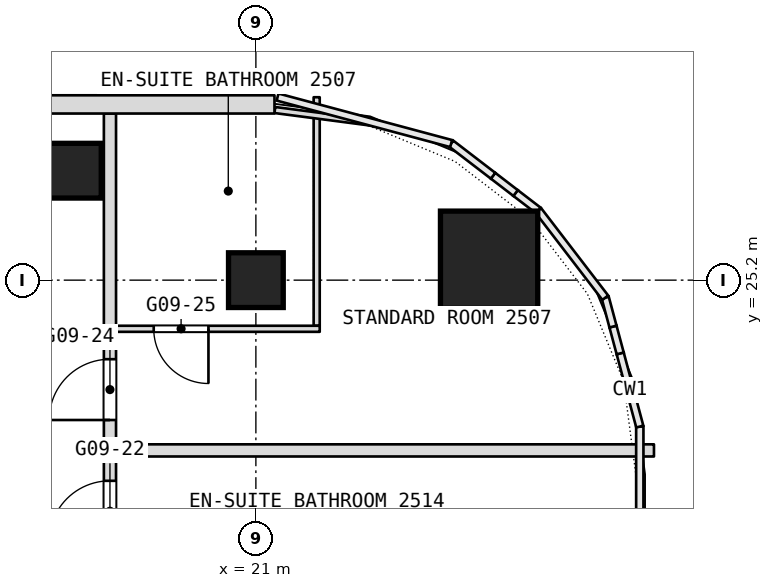
"""IFC4 building model, lengths in metres.
Left out: names, types, materials, properties, quantities, classifications, styles, units other than length and angle.
Written with IfcOpenShell. Run it as: python <this file> out.ifc"""

import sys

from ifc_helpers import new_model, si_unit, direction, frame, frame_2d, origin, origin_2d, place, context, subcontext, project, spatial, rectangle, extrude, element, fill, save


model = new_model("IFC4")
c1 = context("Model", 3, precision=1e-05, world=origin(), true_north=direction((0.0, 1.0)))
c2 = subcontext(c1, "Body", "Model", "MODEL_VIEW")
j1 = project(units=[si_unit("LENGTHUNIT", "METRE"), si_unit("PLANEANGLEUNIT", "RADIAN")], contexts=[c1])
p1 = place(None, origin())
s1 = spatial("IfcSite", under=j1, at=p1, CompositionType="ELEMENT")
p2 = place(p1, origin())
s2 = spatial("IfcBuilding", under=s1, at=p2, CompositionType="ELEMENT")
p3 = place(p2, frame((0.0, 0.0, 115.7)))
s3 = spatial("IfcBuildingStorey", under=s2, at=p3, CompositionType="ELEMENT", Elevation=115.7)
p4 = place(p3, frame((24.835, 25.535, 0.0), z_axis=(0.0, 0.0, 1.0), x_axis=(1.0, 0.0, 0.0)))
e1 = element("IfcColumn", 1, at=p4, inside=s3, PredefinedType="COLUMN", context=c2, shape_type="SweptSolid", body=[
    extrude(rectangle(XDim=1.6, YDim=1.6, at=origin_2d()), origin(), (0.0, 0.0, 1.0), 3.6),
])
for number, where, z_axis, x_axis in (
    (2, (21.0, 25.2, 0.0), (0.0, 0.0, 1.0), (1.0, 0.0, 0.0)),
    (3, (18.007, 27.0, 0.0), (0.0, 0.0, 1.0), (1.0, 0.0, 0.0)),
):
    element("IfcColumn", number, at=place(p3, frame(where, z_axis=z_axis, x_axis=x_axis)), inside=s3, PredefinedType="COLUMN", context=c2, shape_type="SweptSolid", body=[
        extrude(rectangle(XDim=0.9, YDim=0.9, at=origin_2d()), origin(), (0.0, 0.0, 1.0), 3.6),
    ])
p5 = place(p3, frame((22.0, 24.45, 0.0), z_axis=(0.0, 0.0, 1.0), x_axis=(0.0, 1.0, 0.0)))
e4 = element("IfcWall", 4, at=p5, inside=s3, PredefinedType="PARTITIONING", context=c2, shape_type="SweptSolid", body=[
    extrude(rectangle(XDim=3.758, YDim=0.1, at=frame_2d((1.879, 0.0))), origin(), (0.0, 0.0, 1.0), 3.34),
])
p6 = place(p3, frame((18.6, -21.708, 0.0), z_axis=(0.0, 0.0, 1.0), x_axis=(0.0, 1.0, 0.0)))
e5 = element("IfcWall", 5, at=p6, inside=s3, PredefinedType="PARTITIONING", context=c2, shape_type="SweptSolid", body=[
    extrude(rectangle(XDim=49.648, YDim=0.2, at=frame_2d((24.824, 0.0))), origin(), (0.0, 0.0, 1.0), 3.34),
])
p7 = place(p6, frame((2.8, 0.0, 0.0)))
e6 = element("IfcOpeningElement", 6, at=p7, cuts=e5, PredefinedType="OPENING", context=c2, shape_type="SweptSolid", body=[
    extrude(rectangle(XDim=1.0, YDim=2.1, at=frame_2d((0.5, 1.05))), frame((0.0, 0.1, 0.0), z_axis=(0.0, -1.0, 0.0), x_axis=(1.0, 0.0, 0.0)), (0.0, 0.0, 1.0), 0.2),
])
p8 = place(p6, frame((10.658, 0.0, 0.0)))
e7 = element("IfcOpeningElement", 7, at=p8, cuts=e5, PredefinedType="OPENING", context=c2, shape_type="SweptSolid", body=[
    extrude(rectangle(XDim=1.1, YDim=2.1, at=frame_2d((0.55, 1.05))), frame((0.0, 0.1, 0.0), z_axis=(0.0, -1.0, 0.0), x_axis=(1.0, 0.0, 0.0)), (0.0, 0.0, 1.0), 0.2),
])
p9 = place(p6, frame((16.608, 0.0, 0.0)))
e8 = element("IfcOpeningElement", 8, at=p9, cuts=e5, PredefinedType="OPENING", context=c2, shape_type="SweptSolid", body=[
    extrude(rectangle(XDim=1.8, YDim=2.1, at=frame_2d((0.9, 1.05))), frame((0.0, 0.1, 0.0), z_axis=(0.0, -1.0, 0.0), x_axis=(1.0, 0.0, 0.0)), (0.0, 0.0, 1.0), 0.2),
])
p10 = place(p6, frame((24.508, 0.0, 0.0)))
e9 = element("IfcOpeningElement", 9, at=p10, cuts=e5, PredefinedType="OPENING", context=c2, shape_type="SweptSolid", body=[
    extrude(rectangle(XDim=1.0, YDim=2.1, at=frame_2d((0.5, 1.05))), frame((0.0, 0.1, 0.0), z_axis=(0.0, -1.0, 0.0), x_axis=(1.0, 0.0, 0.0)), (0.0, 0.0, 1.0), 0.2),
])
p11 = place(p6, frame((26.308, 0.0, 0.0)))
e10 = element("IfcOpeningElement", 10, at=p11, cuts=e5, PredefinedType="OPENING", context=c2, shape_type="SweptSolid", body=[
    extrude(rectangle(XDim=1.0, YDim=2.1, at=frame_2d((0.5, 1.05))), frame((0.0, 0.1, 0.0), z_axis=(0.0, -1.0, 0.0), x_axis=(1.0, 0.0, 0.0)), (0.0, 0.0, 1.0), 0.2),
])
p12 = place(p6, frame((33.708, 0.0, 0.0)))
e11 = element("IfcOpeningElement", 11, at=p12, cuts=e5, PredefinedType="OPENING", context=c2, shape_type="SweptSolid", body=[
    extrude(rectangle(XDim=1.1, YDim=2.1, at=frame_2d((0.55, 1.05))), frame((0.0, 0.1, 0.0), z_axis=(0.0, -1.0, 0.0), x_axis=(1.0, 0.0, 0.0)), (0.0, 0.0, 1.0), 0.2),
])
p13 = place(p6, frame((42.608, 0.0, 0.0)))
e12 = element("IfcOpeningElement", 12, at=p13, cuts=e5, PredefinedType="OPENING", context=c2, shape_type="SweptSolid", body=[
    extrude(rectangle(XDim=1.0, YDim=2.1, at=frame_2d((0.5, 1.05))), frame((0.0, 0.1, 0.0), z_axis=(0.0, -1.0, 0.0), x_axis=(1.0, 0.0, 0.0)), (0.0, 0.0, 1.0), 0.2),
])
p14 = place(p6, frame((44.608, 0.0, 0.0)))
e13 = element("IfcOpeningElement", 13, at=p14, cuts=e5, PredefinedType="OPENING", context=c2, shape_type="SweptSolid", body=[
    extrude(rectangle(XDim=1.0, YDim=2.1, at=frame_2d((0.5, 1.05))), frame((0.0, 0.1, 0.0), z_axis=(0.0, -1.0, 0.0), x_axis=(1.0, 0.0, 0.0)), (0.0, 0.0, 1.0), 0.2),
])
p15 = place(p3, frame((18.7, 22.4, 0.0), z_axis=(0.0, 0.0, 1.0), x_axis=(1.0, 0.0, 0.0)))
e14 = element("IfcWall", 14, at=p15, inside=s3, PredefinedType="PARTITIONING", context=c2, shape_type="SweptSolid", body=[
    extrude(rectangle(XDim=8.847, YDim=0.2, at=frame_2d((4.424, 0.0))), origin(), (0.0, 0.0, 1.0), 3.34),
])
p16 = place(p3, frame((18.7, 24.4, 0.0), z_axis=(0.0, 0.0, 1.0), x_axis=(1.0, 0.0, 0.0)))
e15 = element("IfcWall", 15, at=p16, inside=s3, PredefinedType="PARTITIONING", context=c2, shape_type="SweptSolid", body=[
    extrude(rectangle(XDim=3.35, YDim=0.1, at=frame_2d((1.675, 0.0))), origin(), (0.0, 0.0, 1.0), 3.34),
])
p17 = place(p16, frame((0.62, 0.0, 0.0)))
e16 = element("IfcOpeningElement", 16, at=p17, cuts=e15, PredefinedType="OPENING", context=c2, shape_type="SweptSolid", body=[
    extrude(rectangle(XDim=0.9, YDim=2.1, at=frame_2d((0.45, 1.05))), frame((0.0, 0.05, 0.0), z_axis=(0.0, -1.0, 0.0), x_axis=(1.0, 0.0, 0.0)), (0.0, 0.0, 1.0), 0.1),
])
p18 = place(p3, frame((21.312, 27.998, 0.0), z_axis=(0.0, 0.0, 1.0), x_axis=(0.991547575144, -0.129743617284, 0.0)))
e17 = element("IfcWall", 17, at=p18, inside=s3, PredefinedType="PARTITIONING", context=c2, shape_type="SweptSolid", body=[
    extrude(rectangle(XDim=1.626, YDim=0.1, at=frame_2d((0.813, 0.0))), origin(), (0.0, 0.0, 1.0), 3.34),
])
p19 = place(p3, frame((21.306, 28.09, 0.0), z_axis=(0.0, 0.0, 1.0), x_axis=(-1.0, 0.0, 0.0)))
e18 = element("IfcWall", 18, at=p19, inside=s3, PredefinedType="NOTDEFINED", context=c2, shape_type="SweptSolid", body=[
    extrude(rectangle(XDim=42.612, YDim=0.3, at=frame_2d((21.306, 0.0))), origin(), (0.0, 0.0, 1.0), 3.6),
])
p20 = place(p19, frame((5.406, 0.0, 0.9)))
e19 = element("IfcOpeningElement", 19, at=p20, cuts=e18, PredefinedType="OPENING", context=c2, shape_type="SweptSolid", body=[
    extrude(rectangle(XDim=2.4, YDim=2.1, at=frame_2d((1.2, 1.05))), frame((0.0, 0.15, 0.0), z_axis=(0.0, -1.0, 0.0), x_axis=(1.0, 0.0, 0.0)), (0.0, 0.0, 1.0), 0.3),
])
p21 = place(p19, frame((9.606, 0.0, 0.9)))
e20 = element("IfcOpeningElement", 20, at=p21, cuts=e18, PredefinedType="OPENING", context=c2, shape_type="SweptSolid", body=[
    extrude(rectangle(XDim=2.4, YDim=2.1, at=frame_2d((1.2, 1.05))), frame((0.0, 0.15, 0.0), z_axis=(0.0, -1.0, 0.0), x_axis=(1.0, 0.0, 0.0)), (0.0, 0.0, 1.0), 0.3),
])
p22 = place(p19, frame((13.806, 0.0, 0.9)))
e21 = element("IfcOpeningElement", 21, at=p22, cuts=e18, PredefinedType="OPENING", context=c2, shape_type="SweptSolid", body=[
    extrude(rectangle(XDim=2.4, YDim=2.1, at=frame_2d((1.2, 1.05))), frame((0.0, 0.15, 0.0), z_axis=(0.0, -1.0, 0.0), x_axis=(1.0, 0.0, 0.0)), (0.0, 0.0, 1.0), 0.3),
])
p23 = place(p19, frame((18.006, 0.0, 0.9)))
e22 = element("IfcOpeningElement", 22, at=p23, cuts=e18, PredefinedType="OPENING", context=c2, shape_type="SweptSolid", body=[
    extrude(rectangle(XDim=2.4, YDim=2.1, at=frame_2d((1.2, 1.05))), frame((0.0, 0.15, 0.0), z_axis=(0.0, -1.0, 0.0), x_axis=(1.0, 0.0, 0.0)), (0.0, 0.0, 1.0), 0.3),
])
p24 = place(p19, frame((22.206, 0.0, 0.9)))
e23 = element("IfcOpeningElement", 23, at=p24, cuts=e18, PredefinedType="OPENING", context=c2, shape_type="SweptSolid", body=[
    extrude(rectangle(XDim=2.4, YDim=2.1, at=frame_2d((1.2, 1.05))), frame((0.0, 0.15, 0.0), z_axis=(0.0, -1.0, 0.0), x_axis=(1.0, 0.0, 0.0)), (0.0, 0.0, 1.0), 0.3),
])
p25 = place(p19, frame((26.406, 0.0, 0.9)))
e24 = element("IfcOpeningElement", 24, at=p25, cuts=e18, PredefinedType="OPENING", context=c2, shape_type="SweptSolid", body=[
    extrude(rectangle(XDim=2.4, YDim=2.1, at=frame_2d((1.2, 1.05))), frame((0.0, 0.15, 0.0), z_axis=(0.0, -1.0, 0.0), x_axis=(1.0, 0.0, 0.0)), (0.0, 0.0, 1.0), 0.3),
])
p26 = place(p19, frame((30.606, 0.0, 0.9)))
e25 = element("IfcOpeningElement", 25, at=p26, cuts=e18, PredefinedType="OPENING", context=c2, shape_type="SweptSolid", body=[
    extrude(rectangle(XDim=2.4, YDim=2.1, at=frame_2d((1.2, 1.05))), frame((0.0, 0.15, 0.0), z_axis=(0.0, -1.0, 0.0), x_axis=(1.0, 0.0, 0.0)), (0.0, 0.0, 1.0), 0.3),
])
p27 = place(p19, frame((34.806, 0.0, 0.9)))
e26 = element("IfcOpeningElement", 26, at=p27, cuts=e18, PredefinedType="OPENING", context=c2, shape_type="SweptSolid", body=[
    extrude(rectangle(XDim=2.4, YDim=2.1, at=frame_2d((1.2, 1.05))), frame((0.0, 0.15, 0.0), z_axis=(0.0, -1.0, 0.0), x_axis=(1.0, 0.0, 0.0)), (0.0, 0.0, 1.0), 0.3),
])
p28 = place(p13, origin())
e27 = element("IfcDoor", 27, at=p28, inside=s3, OperationType="SINGLE_SWING_RIGHT", PredefinedType="DOOR", context=c2, shape_type="SweptSolid", body=[
    extrude(rectangle(XDim=1.0, YDim=2.1, at=frame_2d((0.5, 1.05))), frame((0.0, 0.025, 0.0), z_axis=(0.0, -1.0, 0.0), x_axis=(1.0, 0.0, 0.0)), (0.0, 0.0, 1.0), 0.05),
])
fill(e12, e27)
p29 = place(p14, origin())
e28 = element("IfcDoor", 28, at=p29, inside=s3, OperationType="SINGLE_SWING_RIGHT", PredefinedType="DOOR", context=c2, shape_type="SweptSolid", body=[
    extrude(rectangle(XDim=1.0, YDim=2.1, at=frame_2d((0.5, 1.05))), frame((0.0, 0.025, 0.0), z_axis=(0.0, -1.0, 0.0), x_axis=(1.0, 0.0, 0.0)), (0.0, 0.0, 1.0), 0.05),
])
fill(e13, e28)
p30 = place(p17, origin())
e29 = element("IfcDoor", 29, at=p30, inside=s3, OperationType="SINGLE_SWING_RIGHT", PredefinedType="DOOR", context=c2, shape_type="SweptSolid", body=[
    extrude(rectangle(XDim=0.9, YDim=2.1, at=frame_2d((0.45, 1.05))), frame((0.0, 0.025, 0.0), z_axis=(0.0, -1.0, 0.0), x_axis=(1.0, 0.0, 0.0)), (0.0, 0.0, 1.0), 0.05),
])
fill(e16, e29)
save(model, sys.argv[1])
